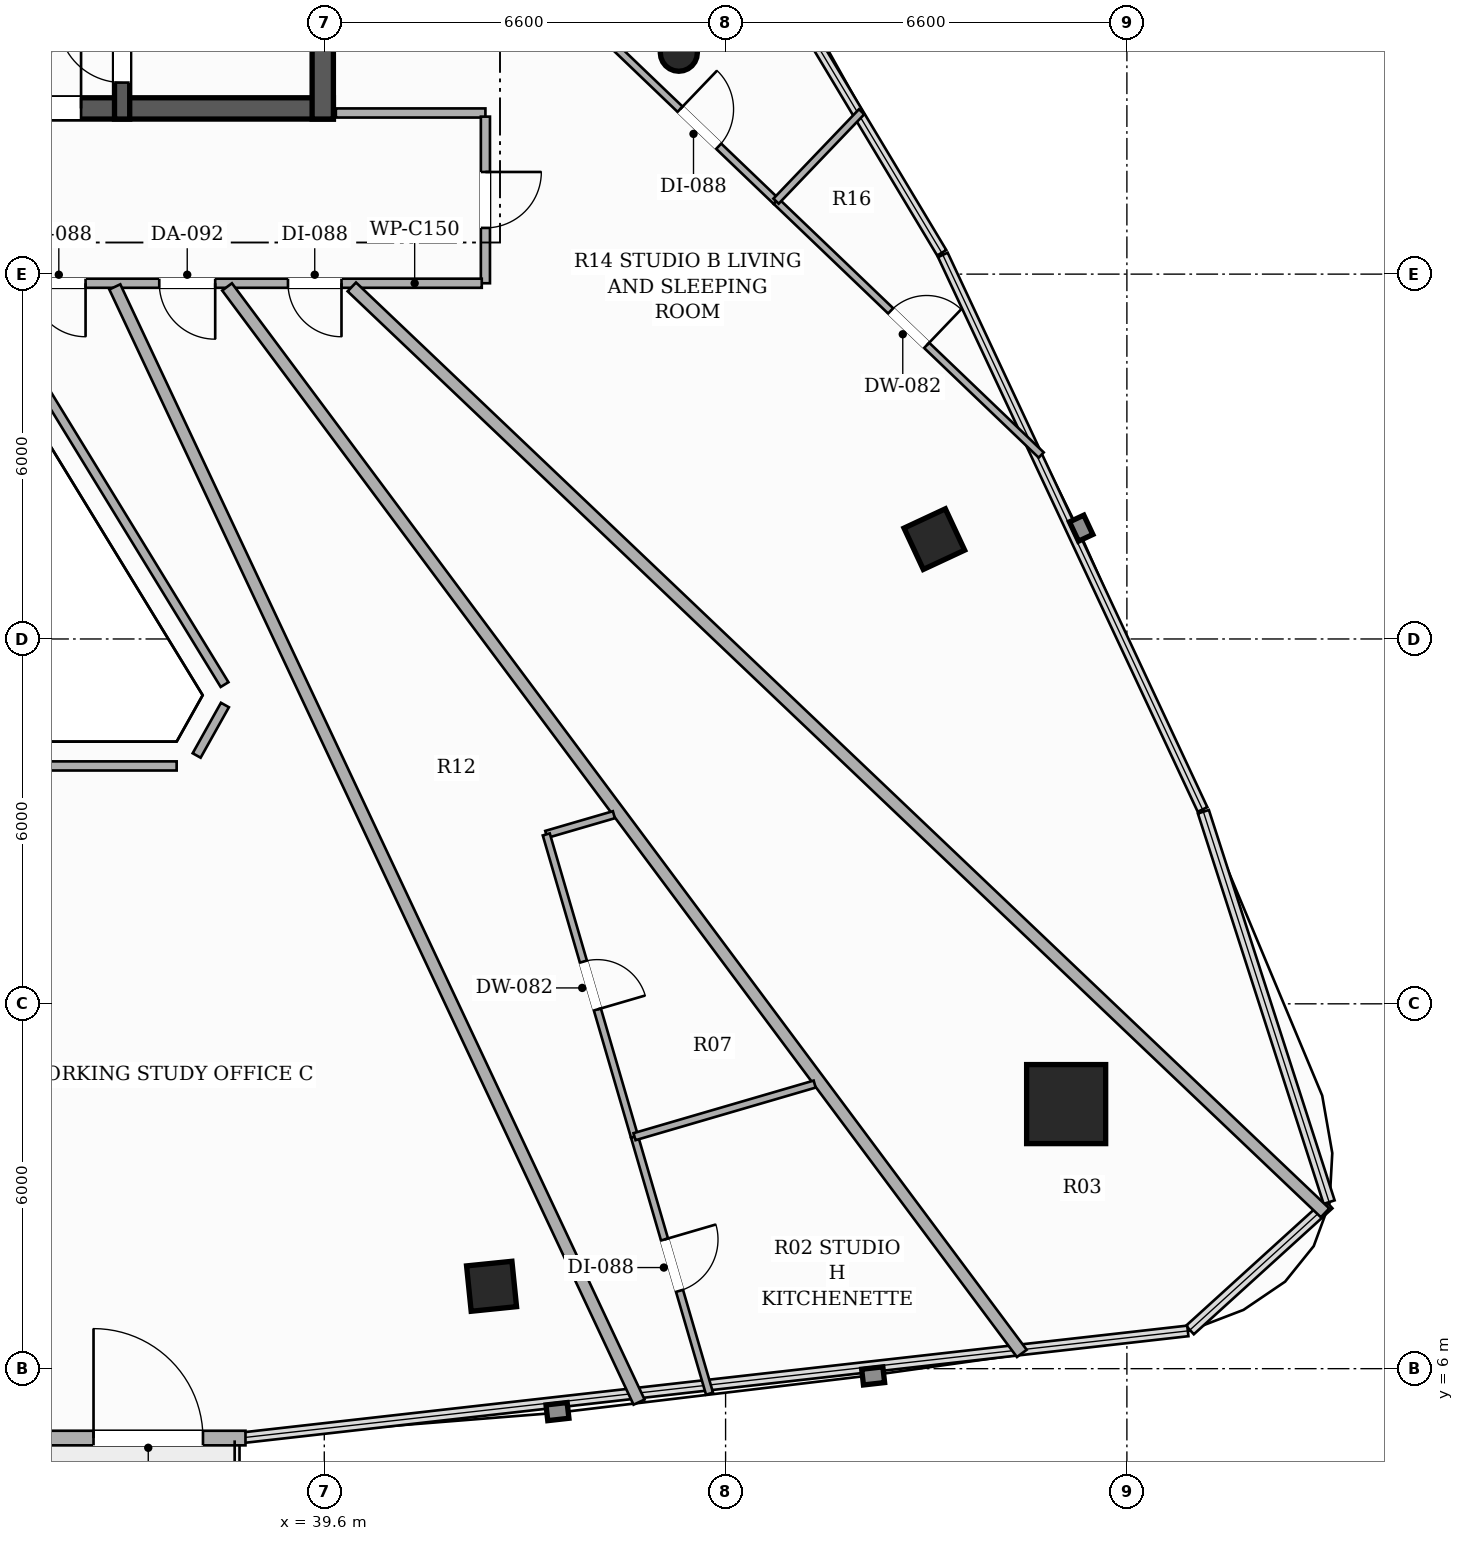
"""IFC4 building model, lengths in metres.
Left out: names, types, materials, properties, quantities, classifications, styles, units other than length and angle.
Written with IfcOpenShell. Run it as: python <this file> out.ifc"""

import sys

from ifc_helpers import new_model, si_unit, direction, frame, frame_2d, origin, origin_2d, place, context, subcontext, project, spatial, rectangle, hollow_rectangle, hollow_circle, extrude, element, fill, save


model = new_model("IFC4")
c1 = context("Model", 3, precision=1e-05, world=origin(), true_north=direction((0.0, 1.0)))
c2 = subcontext(c1, "Body", "Model", "MODEL_VIEW")
j1 = project(units=[si_unit("LENGTHUNIT", "METRE"), si_unit("PLANEANGLEUNIT", "RADIAN")], contexts=[c1])
p1 = place(None, origin())
s1 = spatial("IfcSite", under=j1, at=p1, CompositionType="ELEMENT")
p2 = place(p1, origin())
s2 = spatial("IfcBuilding", under=s1, at=p2, CompositionType="ELEMENT")
p3 = place(p2, frame((0.0, 0.0, 219.5)))
s3 = spatial("IfcBuildingStorey", under=s2, at=p3, CompositionType="ELEMENT", Elevation=219.5)
p4 = place(p3, frame((26.25, 26.725, 0.0), z_axis=(0.0, 0.0, 1.0), x_axis=(1.0, 0.0, 0.0)))
e1 = element("IfcWall", 1, at=p4, inside=s3, PredefinedType="SHEAR", context=c2, shape_type="SweptSolid", body=[
    extrude(rectangle(XDim=13.5, YDim=0.35, at=frame_2d((6.75, 0.0))), origin(), (0.0, 0.0, 1.0), 3.3),
])
p5 = place(p4, frame((4.35, 0.0, 0.0)))
e2 = element("IfcOpeningElement", 2, at=p5, cuts=e1, PredefinedType="OPENING", context=c2, shape_type="SweptSolid", body=[
    extrude(rectangle(XDim=1.05, YDim=2.15, at=frame_2d((0.525, 1.075))), frame((0.0, 0.185, 0.0), z_axis=(0.0, -1.0, 0.0), x_axis=(1.0, 0.0, 0.0)), (0.0, 0.0, 1.0), 0.37),
])
p6 = place(p4, frame((8.3, 0.0, 0.0)))
e3 = element("IfcOpeningElement", 3, at=p6, cuts=e1, PredefinedType="OPENING", context=c2, shape_type="SweptSolid", body=[
    extrude(rectangle(XDim=1.05, YDim=2.15, at=frame_2d((0.525, 1.075))), frame((0.0, 0.185, 0.0), z_axis=(0.0, -1.0, 0.0), x_axis=(1.0, 0.0, 0.0)), (0.0, 0.0, 1.0), 0.37),
])
p7 = place(p3, frame((39.575, 26.55, 0.0), z_axis=(0.0, 0.0, 1.0), x_axis=(0.0, 1.0, 0.0)))
e4 = element("IfcWall", 4, at=p7, inside=s3, PredefinedType="SHEAR", context=c2, shape_type="SweptSolid", body=[
    extrude(rectangle(XDim=7.5, YDim=0.35, at=frame_2d((3.75, 0.0))), origin(), (0.0, 0.0, 1.0), 3.3),
])
p8 = place(p3, frame((36.275, 26.55, 0.0), z_axis=(0.0, 0.0, 1.0), x_axis=(0.0, 1.0, 0.0)))
e5 = element("IfcWall", 5, at=p8, inside=s3, PredefinedType="SHEAR", context=c2, shape_type="SweptSolid", body=[
    extrude(rectangle(XDim=8.1, YDim=0.25, at=frame_2d((4.05, 0.0))), origin(), (0.0, 0.0, 1.0), 3.3),
])
p9 = place(p8, frame((0.6, 0.0, 0.0)))
e6 = element("IfcOpeningElement", 6, at=p9, cuts=e5, PredefinedType="OPENING", context=c2, shape_type="SweptSolid", body=[
    extrude(rectangle(XDim=1.05, YDim=2.15, at=frame_2d((0.525, 1.075))), frame((0.0, 0.135, 0.0), z_axis=(0.0, -1.0, 0.0), x_axis=(1.0, 0.0, 0.0)), (0.0, 0.0, 1.0), 0.27),
])
p10 = place(p3, frame((51.801, 10.351, 0.0), z_axis=(0.0, 0.0, 1.0), x_axis=(1.0, 0.0, 0.0)))
e7 = element("IfcColumn", 7, at=p10, inside=s3, PredefinedType="COLUMN", context=c2, shape_type="SweptSolid", body=[
    extrude(hollow_rectangle(XDim=1.3, YDim=1.3, WallThickness=0.04, at=origin_2d()), origin(), (0.0, 0.0, 1.0), 3.3),
])
for number, where, z_axis, x_axis in (
    (8, (42.351, 7.355, 0.0), (0.0, 0.0, 1.0), (0.995, 0.101, 0.0)),
    (9, (49.633, 19.642, 0.0), (0.0, 0.0, 1.0), (-0.423, 0.906, 0.0)),
):
    element("IfcColumn", number, at=place(p3, frame(where, z_axis=z_axis, x_axis=x_axis)), inside=s3, PredefinedType="COLUMN", context=c2, shape_type="SweptSolid", body=[
        extrude(hollow_rectangle(XDim=0.75, YDim=0.75, WallThickness=0.025, at=origin_2d()), origin(), (0.0, 0.0, 1.0), 3.3),
    ])
p11 = place(p3, frame((45.431, 27.641, 0.0), z_axis=(0.0, 0.0, 1.0), x_axis=(1.0, 0.0, 0.0)))
e10 = element("IfcColumn", 10, at=p11, inside=s3, PredefinedType="COLUMN", context=c2, shape_type="SweptSolid", body=[
    extrude(hollow_circle(Radius=0.305, WallThickness=0.016, at=origin_2d()), origin(), (0.0, 0.0, 1.0), 3.3),
])
p12 = place(p3, frame((27.696, 4.859, 0.0), z_axis=(0.0, 0.0, 1.0), x_axis=(1.0, 0.0, 0.0)))
e11 = element("IfcWall", 11, at=p12, inside=s3, PredefinedType="SOLIDWALL", context=c2, shape_type="SweptSolid", body=[
    extrude(rectangle(XDim=10.608, YDim=0.24, at=frame_2d((5.304, 0.0))), origin(), (0.0, 0.0, 1.0), 2.624),
])
p13 = place(p12, frame((8.109, 0.0, 0.0)))
e12 = element("IfcOpeningElement", 12, at=p13, cuts=e11, PredefinedType="OPENING", context=c2, shape_type="SweptSolid", body=[
    extrude(rectangle(XDim=1.8, YDim=2.2, at=frame_2d((0.9, 1.1))), frame((0.0, 0.13, 0.0), z_axis=(0.0, -1.0, 0.0), x_axis=(1.0, 0.0, 0.0)), (0.0, 0.0, 1.0), 0.26),
])
p14 = place(p3, frame((39.79, 26.65, 0.0), z_axis=(0.0, 0.0, 1.0), x_axis=(1.0, 0.0, 0.0)))
e13 = element("IfcWall", 13, at=p14, inside=s3, PredefinedType="PARTITIONING", context=c2, shape_type="SweptSolid", body=[
    extrude(rectangle(XDim=2.46, YDim=0.15, at=frame_2d((1.23, 0.0))), origin(), (0.0, 0.0, 1.0), 2.565),
])
p15 = place(p3, frame((42.25, 26.59, 0.0), z_axis=(0.0, 0.0, 1.0), x_axis=(0.0, -1.0, 0.0)))
e14 = element("IfcWall", 14, at=p15, inside=s3, PredefinedType="PARTITIONING", context=c2, shape_type="SweptSolid", body=[
    extrude(rectangle(XDim=2.74, YDim=0.15, at=frame_2d((1.37, 0.0))), origin(), (0.0, 0.0, 1.0), 2.773),
])
p16 = place(p15, frame((0.91, 0.0, 0.0)))
e15 = element("IfcOpeningElement", 15, at=p16, cuts=e14, PredefinedType="OPENING", context=c2, shape_type="SweptSolid", body=[
    extrude(rectangle(XDim=0.92, YDim=2.15, at=frame_2d((0.46, 1.075))), frame((0.0, 0.085, 0.0), z_axis=(0.0, -1.0, 0.0), x_axis=(1.0, 0.0, 0.0)), (0.0, 0.0, 1.0), 0.17),
])
p17 = place(p3, frame((42.19, 23.85, 0.0), z_axis=(0.0, 0.0, 1.0), x_axis=(-1.0, 0.0, 0.0)))
e16 = element("IfcWall", 16, at=p17, inside=s3, PredefinedType="PARTITIONING", context=c2, shape_type="SweptSolid", body=[
    extrude(rectangle(XDim=8.263, YDim=0.15, at=frame_2d((4.131, 0.0))), origin(), (0.0, 0.0, 1.0), 2.565),
])
p18 = place(p17, frame((6.516, 0.0, 0.0)))
e17 = element("IfcOpeningElement", 17, at=p18, cuts=e16, PredefinedType="OPENING", context=c2, shape_type="SweptSolid", body=[
    extrude(rectangle(XDim=0.88, YDim=2.1, at=frame_2d((0.44, 1.05))), frame((0.0, 0.085, 0.0), z_axis=(0.0, -1.0, 0.0), x_axis=(1.0, 0.0, 0.0)), (0.0, 0.0, 1.0), 0.17),
])
p19 = place(p17, frame((2.307, 0.0, 0.0)))
e18 = element("IfcOpeningElement", 18, at=p19, cuts=e16, PredefinedType="OPENING", context=c2, shape_type="SweptSolid", body=[
    extrude(rectangle(XDim=0.88, YDim=2.1, at=frame_2d((0.44, 1.05))), frame((0.0, 0.085, 0.0), z_axis=(0.0, -1.0, 0.0), x_axis=(1.0, 0.0, 0.0)), (0.0, 0.0, 1.0), 0.17),
])
p20 = place(p17, frame((4.384, 0.0, 0.0)))
e19 = element("IfcOpeningElement", 19, at=p20, cuts=e16, PredefinedType="OPENING", context=c2, shape_type="SweptSolid", body=[
    extrude(rectangle(XDim=0.92, YDim=2.15, at=frame_2d((0.46, 1.075))), frame((0.0, 0.085, 0.0), z_axis=(0.0, -1.0, 0.0), x_axis=(1.0, 0.0, 0.0)), (0.0, 0.0, 1.0), 0.17),
])
p21 = place(p3, frame((33.958, 23.79, 0.0), z_axis=(0.0, 0.0, 1.0), x_axis=(0.521949656317, -0.852976292912, 0.0)))
e20 = element("IfcWall", 20, at=p21, inside=s3, PredefinedType="PARTITIONING", context=c2, shape_type="SweptSolid", body=[
    extrude(rectangle(XDim=7.667, YDim=0.15, at=frame_2d((3.833, 0.0))), origin(), (0.0, 0.0, 1.0), 2.773),
])
p22 = place(p3, frame((37.966, 16.914, 0.0), z_axis=(0.0, 0.0, 1.0), x_axis=(-0.48879868802, -0.872396608539, 0.0)))
e21 = element("IfcWall", 21, at=p22, inside=s3, PredefinedType="PARTITIONING", context=c2, shape_type="SweptSolid", body=[
    extrude(rectangle(XDim=0.951, YDim=0.15, at=frame_2d((0.476, 0.0))), origin(), (0.0, 0.0, 1.0), 3.06),
])
p23 = place(p3, frame((37.172, 15.912, 0.0), z_axis=(0.0, 0.0, 1.0), x_axis=(-1.0, 0.0, 0.0)))
e22 = element("IfcWall", 22, at=p23, inside=s3, PredefinedType="PARTITIONING", context=c2, shape_type="SweptSolid", body=[
    extrude(rectangle(XDim=8.344, YDim=0.15, at=frame_2d((4.172, 0.0))), origin(), (0.0, 0.0, 1.0), 2.773),
])
p24 = place(p3, frame((56.059, 8.563, 0.0), z_axis=(0.0, 0.0, 1.0), x_axis=(-0.724518891706, 0.689254942355, 0.0)))
e23 = element("IfcWall", 23, at=p24, inside=s3, PredefinedType="PARTITIONING", context=c2, shape_type="SweptSolid", body=[
    extrude(rectangle(XDim=22.092, YDim=0.2, at=frame_2d((11.046, 0.0))), origin(), (0.0, 0.0, 1.0), 2.492),
])
p25 = place(p3, frame((36.155, 23.79, 0.0), z_axis=(0.0, 0.0, 1.0), x_axis=(0.425451226132, -0.90498135571, 0.0)))
e24 = element("IfcWall", 24, at=p25, inside=s3, PredefinedType="PARTITIONING", context=c2, shape_type="SweptSolid", body=[
    extrude(rectangle(XDim=20.266, YDim=0.2, at=frame_2d((10.133, 0.0))), origin(), (0.0, 0.0, 1.0), 2.492),
])
p26 = place(p3, frame((51.072, 6.251, 0.0), z_axis=(0.0, 0.0, 1.0), x_axis=(-0.59756139073, 0.801823162742, 0.0)))
e25 = element("IfcWall", 25, at=p26, inside=s3, PredefinedType="PARTITIONING", context=c2, shape_type="SweptSolid", body=[
    extrude(rectangle(XDim=21.874, YDim=0.2, at=frame_2d((10.937, 0.0))), origin(), (0.0, 0.0, 1.0), 2.492),
])
p27 = place(p3, frame((47.03, 25.2, 0.0), z_axis=(0.0, 0.0, 1.0), x_axis=(0.722345830301, -0.691531995968, 0.0)))
e26 = element("IfcWall", 26, at=p27, inside=s3, PredefinedType="PARTITIONING", context=c2, shape_type="SweptSolid", body=[
    extrude(rectangle(XDim=6.037, YDim=0.12, at=frame_2d((3.019, 0.0))), origin(), (0.0, 0.0, 1.0), 2.492),
])
p28 = place(p27, frame((2.609, 0.0, 0.0)))
e27 = element("IfcOpeningElement", 27, at=p28, cuts=e26, PredefinedType="OPENING", context=c2, shape_type="SweptSolid", body=[
    extrude(rectangle(XDim=0.82, YDim=2.1, at=frame_2d((0.41, 1.05))), frame((0.0, 0.07, 0.0), z_axis=(0.0, -1.0, 0.0), x_axis=(1.0, 0.0, 0.0)), (0.0, 0.0, 1.0), 0.14),
])
p29 = place(p3, frame((43.44, 28.638, 0.0), z_axis=(0.0, 0.0, 1.0), x_axis=(0.722240667523, -0.691641827954, 0.0)))
e28 = element("IfcWall", 28, at=p29, inside=s3, PredefinedType="PARTITIONING", context=c2, shape_type="SweptSolid", body=[
    extrude(rectangle(XDim=4.971, YDim=0.12, at=frame_2d((2.485, 0.0))), origin(), (0.0, 0.0, 1.0), 2.492),
])
p30 = place(p29, frame((2.785, 0.0, 0.0)))
e29 = element("IfcOpeningElement", 29, at=p30, cuts=e28, PredefinedType="OPENING", context=c2, shape_type="SweptSolid", body=[
    extrude(rectangle(XDim=0.88, YDim=2.1, at=frame_2d((0.44, 1.05))), frame((0.0, 0.07, 0.0), z_axis=(0.0, -1.0, 0.0), x_axis=(1.0, 0.0, 0.0)), (0.0, 0.0, 1.0), 0.14),
])
p31 = place(p3, frame((47.03, 25.2, 0.0), z_axis=(0.0, 0.0, 1.0), x_axis=(0.691459612883, 0.722415118717, 0.0)))
e30 = element("IfcWall", 30, at=p31, inside=s3, PredefinedType="PARTITIONING", context=c2, shape_type="SweptSolid", body=[
    extrude(rectangle(XDim=2.035, YDim=0.12, at=frame_2d((1.018, 0.0))), origin(), (0.0, 0.0, 1.0), 2.492),
])
p32 = place(p3, frame((44.363, 15.11, 0.0), z_axis=(0.0, 0.0, 1.0), x_axis=(-0.960030681494, -0.279894784857, 0.0)))
e31 = element("IfcWall", 31, at=p32, inside=s3, PredefinedType="PARTITIONING", context=c2, shape_type="SweptSolid", body=[
    extrude(rectangle(XDim=1.158, YDim=0.12, at=frame_2d((0.579, 0.0))), origin(), (0.0, 0.0, 1.0), 2.773),
])
p33 = place(p3, frame((43.251, 14.786, 0.0), z_axis=(0.0, 0.0, 1.0), x_axis=(0.280190088139, -0.959944537204, 0.0)))
e32 = element("IfcWall", 32, at=p33, inside=s3, PredefinedType="PARTITIONING", context=c2, shape_type="SweptSolid", body=[
    extrude(rectangle(XDim=5.178, YDim=0.12, at=frame_2d((2.589, 0.0))), origin(), (0.0, 0.0, 1.0), 3.06),
])
p34 = place(p33, frame((2.179, 0.0, 0.0)))
e33 = element("IfcOpeningElement", 33, at=p34, cuts=e32, PredefinedType="OPENING", context=c2, shape_type="SweptSolid", body=[
    extrude(rectangle(XDim=0.82, YDim=2.1, at=frame_2d((0.41, 1.05))), frame((0.0, 0.07, 0.0), z_axis=(0.0, -1.0, 0.0), x_axis=(1.0, 0.0, 0.0)), (0.0, 0.0, 1.0), 0.14),
])
p35 = place(p3, frame((44.702, 9.815, 0.0), z_axis=(0.0, 0.0, 1.0), x_axis=(0.28033432121, -0.959902426474, 0.0)))
e34 = element("IfcWall", 34, at=p35, inside=s3, PredefinedType="PARTITIONING", context=c2, shape_type="SweptSolid", body=[
    extrude(rectangle(XDim=4.402, YDim=0.12, at=frame_2d((2.201, 0.0))), origin(), (0.0, 0.0, 1.0), 2.492),
])
p36 = place(p35, frame((1.761, 0.0, 0.0)))
e35 = element("IfcOpeningElement", 35, at=p36, cuts=e34, PredefinedType="OPENING", context=c2, shape_type="SweptSolid", body=[
    extrude(rectangle(XDim=0.88, YDim=2.1, at=frame_2d((0.44, 1.05))), frame((0.0, 0.07, 0.0), z_axis=(0.0, -1.0, 0.0), x_axis=(1.0, 0.0, 0.0)), (0.0, 0.0, 1.0), 0.14),
])
p37 = place(p3, frame((47.665, 10.68, 0.0), z_axis=(0.0, 0.0, 1.0), x_axis=(-0.959935309068, -0.280221702235, 0.0)))
e36 = element("IfcWall", 36, at=p37, inside=s3, PredefinedType="PARTITIONING", context=c2, shape_type="SweptSolid", body=[
    extrude(rectangle(XDim=3.087, YDim=0.12, at=frame_2d((1.543, 0.0))), origin(), (0.0, 0.0, 1.0), 2.773),
])
p38 = place(p13, origin())
e37 = element("IfcDoor", 37, at=p38, inside=s3, OperationType="SINGLE_SWING_LEFT", PredefinedType="DOOR", context=c2, shape_type="SweptSolid", body=[
    extrude(rectangle(XDim=1.8, YDim=2.2, at=frame_2d((0.9, 1.1))), frame((0.0, 0.025, 0.0), z_axis=(0.0, -1.0, 0.0), x_axis=(1.0, 0.0, 0.0)), (0.0, 0.0, 1.0), 0.05),
])
fill(e12, e37)
p39 = place(p9, origin())
e38 = element("IfcDoor", 38, at=p39, inside=s3, OperationType="SINGLE_SWING_RIGHT", PredefinedType="DOOR", context=c2, shape_type="SweptSolid", body=[
    extrude(rectangle(XDim=1.05, YDim=2.15, at=frame_2d((0.525, 1.075))), frame((0.0, 0.025, 0.0), z_axis=(0.0, -1.0, 0.0), x_axis=(1.0, 0.0, 0.0)), (0.0, 0.0, 1.0), 0.05),
])
fill(e6, e38)
p40 = place(p6, origin())
e39 = element("IfcDoor", 39, at=p40, inside=s3, OperationType="SINGLE_SWING_RIGHT", PredefinedType="DOOR", context=c2, shape_type="SweptSolid", body=[
    extrude(rectangle(XDim=1.05, YDim=2.15, at=frame_2d((0.525, 1.075))), frame((0.0, 0.025, 0.0), z_axis=(0.0, -1.0, 0.0), x_axis=(1.0, 0.0, 0.0)), (0.0, 0.0, 1.0), 0.05),
])
fill(e3, e39)
p41 = place(p16, origin())
e40 = element("IfcDoor", 40, at=p41, inside=s3, OperationType="SINGLE_SWING_LEFT", PredefinedType="DOOR", context=c2, shape_type="SweptSolid", body=[
    extrude(rectangle(XDim=0.92, YDim=2.15, at=frame_2d((0.46, 1.075))), frame((0.0, 0.025, 0.0), z_axis=(0.0, -1.0, 0.0), x_axis=(1.0, 0.0, 0.0)), (0.0, 0.0, 1.0), 0.05),
])
fill(e15, e40)
p42 = place(p28, origin())
e41 = element("IfcDoor", 41, at=p42, inside=s3, OperationType="SINGLE_SWING_RIGHT", PredefinedType="DOOR", context=c2, shape_type="SweptSolid", body=[
    extrude(rectangle(XDim=0.82, YDim=2.1, at=frame_2d((0.41, 1.05))), frame((0.0, 0.025, 0.0), z_axis=(0.0, -1.0, 0.0), x_axis=(1.0, 0.0, 0.0)), (0.0, 0.0, 1.0), 0.05),
])
fill(e27, e41)
p43 = place(p30, origin())
e42 = element("IfcDoor", 42, at=p43, inside=s3, OperationType="SINGLE_SWING_LEFT", PredefinedType="DOOR", context=c2, shape_type="SweptSolid", body=[
    extrude(rectangle(XDim=0.88, YDim=2.1, at=frame_2d((0.44, 1.05))), frame((0.0, 0.025, 0.0), z_axis=(0.0, -1.0, 0.0), x_axis=(1.0, 0.0, 0.0)), (0.0, 0.0, 1.0), 0.05),
])
fill(e29, e42)
p44 = place(p18, origin())
e43 = element("IfcDoor", 43, at=p44, inside=s3, OperationType="SINGLE_SWING_LEFT", PredefinedType="DOOR", context=c2, shape_type="SweptSolid", body=[
    extrude(rectangle(XDim=0.88, YDim=2.1, at=frame_2d((0.44, 1.05))), frame((0.0, 0.025, 0.0), z_axis=(0.0, -1.0, 0.0), x_axis=(1.0, 0.0, 0.0)), (0.0, 0.0, 1.0), 0.05),
])
fill(e17, e43)
p45 = place(p19, origin())
e44 = element("IfcDoor", 44, at=p45, inside=s3, OperationType="SINGLE_SWING_LEFT", PredefinedType="DOOR", context=c2, shape_type="SweptSolid", body=[
    extrude(rectangle(XDim=0.88, YDim=2.1, at=frame_2d((0.44, 1.05))), frame((0.0, 0.025, 0.0), z_axis=(0.0, -1.0, 0.0), x_axis=(1.0, 0.0, 0.0)), (0.0, 0.0, 1.0), 0.05),
])
fill(e18, e44)
p46 = place(p20, origin())
e45 = element("IfcDoor", 45, at=p46, inside=s3, OperationType="SINGLE_SWING_LEFT", PredefinedType="DOOR", context=c2, shape_type="SweptSolid", body=[
    extrude(rectangle(XDim=0.92, YDim=2.15, at=frame_2d((0.46, 1.075))), frame((0.0, 0.025, 0.0), z_axis=(0.0, -1.0, 0.0), x_axis=(1.0, 0.0, 0.0)), (0.0, 0.0, 1.0), 0.05),
])
fill(e19, e45)
p47 = place(p34, origin())
e46 = element("IfcDoor", 46, at=p47, inside=s3, OperationType="SINGLE_SWING_RIGHT", PredefinedType="DOOR", context=c2, shape_type="SweptSolid", body=[
    extrude(rectangle(XDim=0.82, YDim=2.1, at=frame_2d((0.41, 1.05))), frame((0.0, 0.025, 0.0), z_axis=(0.0, -1.0, 0.0), x_axis=(1.0, 0.0, 0.0)), (0.0, 0.0, 1.0), 0.05),
])
fill(e33, e46)
p48 = place(p36, origin())
e47 = element("IfcDoor", 47, at=p48, inside=s3, OperationType="SINGLE_SWING_LEFT", PredefinedType="DOOR", context=c2, shape_type="SweptSolid", body=[
    extrude(rectangle(XDim=0.88, YDim=2.1, at=frame_2d((0.44, 1.05))), frame((0.0, 0.025, 0.0), z_axis=(0.0, -1.0, 0.0), x_axis=(1.0, 0.0, 0.0)), (0.0, 0.0, 1.0), 0.05),
])
fill(e35, e47)
save(model, sys.argv[1])
